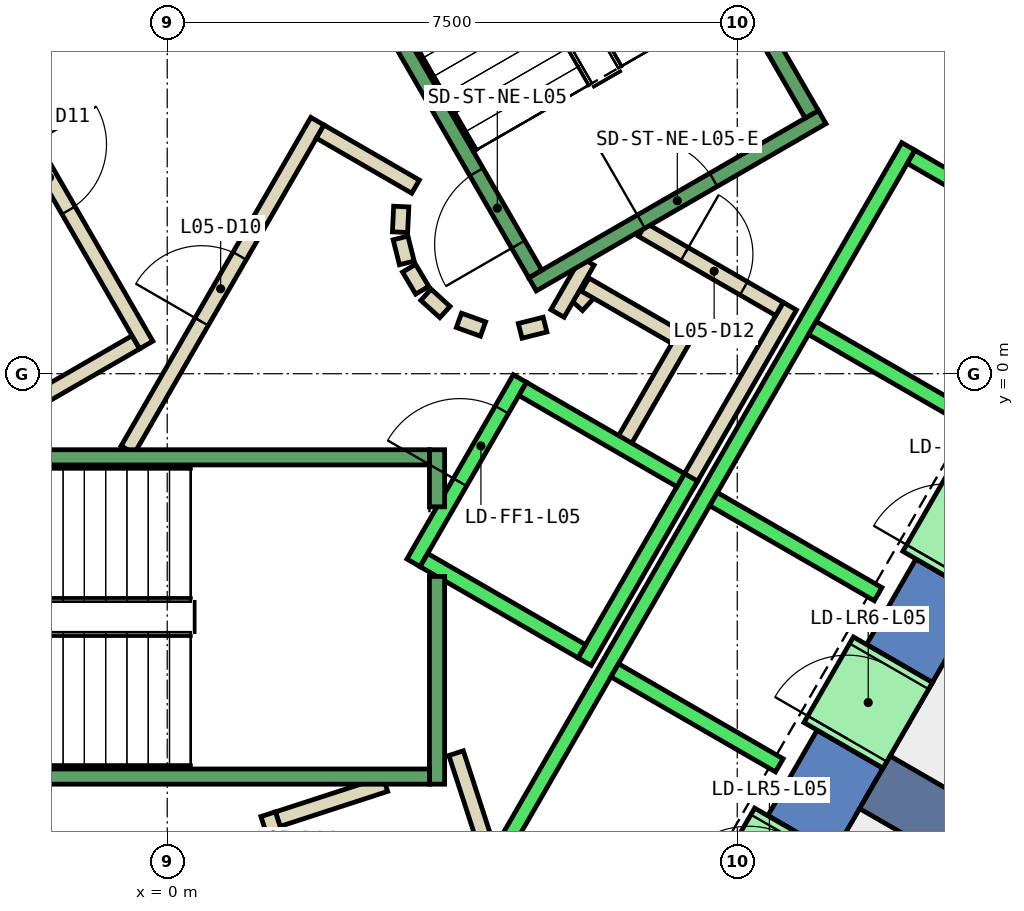
"""IFC4 building model, lengths in metres.
Left out: names, types, materials, properties, quantities, classifications, styles, units other than length and angle.
Written with IfcOpenShell. Run it as: python <this file> out.ifc"""

import sys

from ifc_helpers import new_model, si_unit, direction, frame, frame_2d, origin, place, context, subcontext, project, spatial, polyline, rectangle, outline, extrude, element, fill, save


model = new_model("IFC4")
c1 = context("Model", 3, precision=1e-05, world=origin(), true_north=direction((0.0, 1.0)))
c2 = subcontext(c1, "Body", "Model", "MODEL_VIEW")
j1 = project(units=[si_unit("LENGTHUNIT", "METRE"), si_unit("PLANEANGLEUNIT", "RADIAN")], contexts=[c1])
p1 = place(None, origin())
s1 = spatial("IfcSite", under=j1, at=p1, CompositionType="ELEMENT")
p2 = place(p1, origin())
s2 = spatial("IfcBuilding", under=s1, at=p2, CompositionType="ELEMENT")
p3 = place(p2, frame((0.0, 0.0, 30.0)))
s3 = spatial("IfcBuildingStorey", under=s2, at=p3, CompositionType="ELEMENT", Elevation=30.0)
p4 = place(p3, frame((0.0, 0.0, -0.45)))
e1 = element("IfcWall", 1, at=p4, inside=s3, PredefinedType="SHEAR", context=c2, shape_type="SweptSolid", body=[
    extrude(outline(polyline([(8.517, 11.748), (7.651, 11.248), (12.702, 2.5), (13.856, 2.5), (8.517, 11.748)])), origin(), (0.0, 0.0, 1.0), 4.85),
])
p5 = place(p3, frame((0.0, 0.0, -0.45)))
e2 = element("IfcWall", 2, at=p5, inside=s3, PredefinedType="SHEAR", context=c2, shape_type="SweptSolid", body=[
    extrude(outline(polyline([(9.417, -5.189), (8.551, -4.689), (7.902, -5.814), (8.767, -6.314), (9.417, -5.189)])), origin(), (0.0, 0.0, 1.0), 4.85),
])
p6 = place(p3, frame((0.0, 0.0, -0.45)))
e3 = element("IfcWall", 3, at=p6, inside=s3, PredefinedType="SHEAR", context=c2, shape_type="SweptSolid", body=[
    extrude(outline(polyline([(10.717, -2.937), (9.851, -2.437), (9.201, -3.563), (10.067, -4.063), (10.717, -2.937)])), origin(), (0.0, 0.0, 1.0), 4.85),
])
p7 = place(p3, frame((0.0, 0.0, 3.6)))
e4 = element("IfcWall", 4, at=p7, inside=s3, PredefinedType="SHEAR", context=c2, shape_type="SweptSolid", body=[
    extrude(outline(polyline([(8.767, -6.314), (7.902, -5.814), (7.252, -6.94), (8.117, -7.44), (8.767, -6.314)])), origin(), (0.0, 0.0, 1.0), 0.8),
])
p8 = place(p3, frame((0.0, 0.0, 3.6)))
e5 = element("IfcWall", 5, at=p8, inside=s3, PredefinedType="SHEAR", context=c2, shape_type="SweptSolid", body=[
    extrude(outline(polyline([(10.067, -4.063), (9.201, -3.563), (8.551, -4.689), (9.417, -5.189), (10.067, -4.063)])), origin(), (0.0, 0.0, 1.0), 0.8),
])
p9 = place(p3, frame((0.0, 0.0, 3.6)))
e6 = element("IfcWall", 6, at=p9, inside=s3, PredefinedType="SHEAR", context=c2, shape_type="SweptSolid", body=[
    extrude(outline(polyline([(11.367, -1.811), (10.501, -1.311), (9.851, -2.437), (10.717, -2.937), (11.367, -1.811)])), origin(), (0.0, 0.0, 1.0), 0.8),
])
p10 = place(p3, frame((9.31, -5.375, -0.45), z_axis=(0.0, 0.0, 1.0), x_axis=(0.866017533419, -0.500013631625, 0.0)))
e7 = element("IfcWall", 7, at=p10, inside=s3, PredefinedType="SHEAR", context=c2, shape_type="SweptSolid", body=[
    extrude(rectangle(XDim=9.0, YDim=0.8, at=frame_2d((4.5, 0.0))), origin(), (0.0, 0.0, 1.0), 4.85),
])
p11 = place(p3, frame((5.39, 0.898, 0.0), z_axis=(0.0, 0.0, 1.0), x_axis=(0.673828488714, 0.738887791073, 0.0)))
e8 = element("IfcWall", 8, at=p11, inside=s3, PredefinedType="PARTITIONING", context=c2, shape_type="SweptSolid", body=[
    extrude(rectangle(XDim=0.263, YDim=0.2, at=frame_2d((0.131, 0.0))), origin(), (0.0, 0.0, 1.0), 4.4),
])
p12 = place(p3, frame((5.499, 1.172, 0.0), z_axis=(0.0, 0.0, 1.0), x_axis=(0.866333505267, -0.499465972466, 0.0)))
e9 = element("IfcWall", 9, at=p12, inside=s3, PredefinedType="PARTITIONING", context=c2, shape_type="SweptSolid", body=[
    extrude(rectangle(XDim=1.374, YDim=0.2, at=frame_2d((0.687, 0.0))), origin(), (0.0, 0.0, 1.0), 4.4),
])
p13 = place(p3, frame((6.826, 0.522, 0.0), z_axis=(0.0, 0.0, 1.0), x_axis=(-0.500016722714, -0.866015748706, 0.0)))
e10 = element("IfcWall", 10, at=p13, inside=s3, PredefinedType="PARTITIONING", context=c2, shape_type="SweptSolid", body=[
    extrude(rectangle(XDim=1.7, YDim=0.2, at=frame_2d((0.85, 0.0))), origin(), (0.0, 0.0, 1.0), 4.4),
])
p14 = place(p3, frame((8.192, 0.888, 0.0), z_axis=(0.0, 0.0, 1.0), x_axis=(-0.499940625693, -0.866059680843, 0.0)))
e11 = element("IfcWall", 11, at=p14, inside=s3, PredefinedType="PARTITIONING", context=c2, shape_type="SweptSolid", body=[
    extrude(rectangle(XDim=2.68, YDim=0.2, at=frame_2d((1.34, 0.0))), origin(), (0.0, 0.0, 1.0), 4.4),
])
p15 = place(p3, frame((5.135, 0.793, 0.0), z_axis=(0.0, 0.0, 1.0), x_axis=(0.499526442893, 0.866298639529, 0.0)))
e12 = element("IfcWall", 12, at=p15, inside=s3, PredefinedType="PARTITIONING", context=c2, shape_type="SweptSolid", body=[
    extrude(rectangle(XDim=0.791, YDim=0.2, at=frame_2d((0.396, 0.0))), origin(), (0.0, 0.0, 1.0), 4.4),
])
p16 = place(p3, frame((6.25, 1.894, 0.0), z_axis=(0.0, 0.0, 1.0), x_axis=(0.866043184279, -0.499969202016, 0.0)))
e13 = element("IfcWall", 13, at=p16, inside=s3, PredefinedType="PARTITIONING", context=c2, shape_type="SweptSolid", body=[
    extrude(rectangle(XDim=2.084, YDim=0.2, at=frame_2d((1.042, 0.0))), origin(), (0.0, 0.0, 1.0), 4.4),
])
p17 = place(p16, frame((0.642, 0.0, 0.0)))
e14 = element("IfcOpeningElement", 14, at=p17, cuts=e13, PredefinedType="OPENING", context=c2, shape_type="SweptSolid", body=[
    extrude(rectangle(XDim=0.9, YDim=2.1, at=frame_2d((0.45, 1.05))), frame((0.0, 0.11, 0.0), z_axis=(0.0, -1.0, 0.0), x_axis=(1.0, 0.0, 0.0)), (0.0, 0.0, 1.0), 0.22),
])
p18 = place(p3, frame((2.869, -5.4, 0.0), z_axis=(0.0, 0.0, 1.0), x_axis=(-0.950892787506, -0.309520446287, 0.0)))
e15 = element("IfcWall", 15, at=p18, inside=s3, PredefinedType="PARTITIONING", context=c2, shape_type="SweptSolid", body=[
    extrude(rectangle(XDim=1.487, YDim=0.2, at=frame_2d((0.743, 0.0))), origin(), (0.0, 0.0, 1.0), 4.4),
])
p19 = place(p3, frame((1.328, -5.795, 0.0), z_axis=(0.0, 0.0, 1.0), x_axis=(0.309171157328, -0.951006411901, 0.0)))
e16 = element("IfcWall", 16, at=p19, inside=s3, PredefinedType="PARTITIONING", context=c2, shape_type="SweptSolid", body=[
    extrude(rectangle(XDim=2.401, YDim=0.2, at=frame_2d((1.2, 0.0))), origin(), (0.0, 0.0, 1.0), 4.4),
])
p20 = place(p19, frame((0.75, 0.0, 0.0)))
e17 = element("IfcOpeningElement", 17, at=p20, cuts=e16, PredefinedType="OPENING", context=c2, shape_type="SweptSolid", body=[
    extrude(rectangle(XDim=0.9, YDim=2.1, at=frame_2d((0.45, 1.05))), frame((0.0, 0.11, 0.0), z_axis=(0.0, -1.0, 0.0), x_axis=(1.0, 0.0, 0.0)), (0.0, 0.0, 1.0), 0.22),
])
p21 = place(p3, frame((4.543, -7.275, 0.0), z_axis=(0.0, 0.0, 1.0), x_axis=(-0.309079173229, 0.951036310914, 0.0)))
e18 = element("IfcWall", 18, at=p21, inside=s3, PredefinedType="PARTITIONING", context=c2, shape_type="SweptSolid", body=[
    extrude(rectangle(XDim=2.4, YDim=0.2, at=frame_2d((1.2, 0.0))), origin(), (0.0, 0.0, 1.0), 4.4),
])
p22 = place(p3, frame((3.079, 2.199, 0.0), z_axis=(0.0, 0.0, 1.0), x_axis=(-0.047771483479, -0.998858290933, 0.0)))
e19 = element("IfcWall", 19, at=p22, inside=s3, PredefinedType="PARTITIONING", context=c2, shape_type="SweptSolid", body=[
    extrude(rectangle(XDim=0.337, YDim=0.2, at=frame_2d((0.169, 0.0))), origin(), (0.0, 0.0, 1.0), 4.4),
])
p23 = place(p3, frame((3.07, 1.786, 0.0), z_axis=(0.0, 0.0, 1.0), x_axis=(0.242705583207, -0.970099994784, 0.0)))
e20 = element("IfcWall", 20, at=p23, inside=s3, PredefinedType="PARTITIONING", context=c2, shape_type="SweptSolid", body=[
    extrude(rectangle(XDim=0.338, YDim=0.2, at=frame_2d((0.169, 0.0))), origin(), (0.0, 0.0, 1.0), 4.4),
])
for number, where, z_axis, x_axis in (
    (21, (3.182, 1.388, 0.0), (0.0, 0.0, 1.0), (0.512, -0.859, 0.0)),
    (22, (3.404, 1.039, 0.0), (0.0, 0.0, 1.0), (0.74, -0.672, 0.0)),
):
    element("IfcWall", number, at=place(p3, frame(where, z_axis=z_axis, x_axis=x_axis)), inside=s3, PredefinedType="PARTITIONING", context=c2, shape_type="SweptSolid", body=[
        extrude(rectangle(XDim=0.338, YDim=0.2, at=frame_2d((0.169, 0.0))), origin(), (0.0, 0.0, 1.0), 4.4),
    ])
p24 = place(p3, frame((3.838, 0.702, 0.0), z_axis=(0.0, 0.0, 1.0), x_axis=(0.941035081519, -0.338308993895, 0.0)))
e23 = element("IfcWall", 23, at=p24, inside=s3, PredefinedType="PARTITIONING", context=c2, shape_type="SweptSolid", body=[
    extrude(rectangle(XDim=0.337, YDim=0.2, at=frame_2d((0.168, 0.0))), origin(), (0.0, 0.0, 1.0), 4.4),
])
p25 = place(p3, frame((4.644, 0.564, 0.0), z_axis=(0.0, 0.0, 1.0), x_axis=(0.969929076366, 0.243387729394, 0.0)))
e24 = element("IfcWall", 24, at=p25, inside=s3, PredefinedType="PARTITIONING", context=c2, shape_type="SweptSolid", body=[
    extrude(rectangle(XDim=0.337, YDim=0.2, at=frame_2d((0.168, 0.0))), origin(), (0.0, 0.0, 1.0), 4.4),
])
p26 = place(p3, frame((-0.52, -1.0, 0.0), z_axis=(0.0, 0.0, 1.0), x_axis=(0.50011622646, 0.865958290007, 0.0)))
e25 = element("IfcWall", 25, at=p26, inside=s3, PredefinedType="PARTITIONING", context=c2, shape_type="SweptSolid", body=[
    extrude(rectangle(XDim=4.991, YDim=0.2, at=frame_2d((2.496, 0.0))), origin(), (0.0, 0.0, 1.0), 4.4),
])
p27 = place(p26, frame((1.945, 0.0, 0.0)))
e26 = element("IfcOpeningElement", 26, at=p27, cuts=e25, PredefinedType="OPENING", context=c2, shape_type="SweptSolid", body=[
    extrude(rectangle(XDim=1.0, YDim=2.1, at=frame_2d((0.5, 1.05))), frame((0.0, 0.11, 0.0), z_axis=(0.0, -1.0, 0.0), x_axis=(1.0, 0.0, 0.0)), (0.0, 0.0, 1.0), 0.22),
])
p28 = place(p3, frame((2.012, 3.186, 0.0), z_axis=(0.0, 0.0, 1.0), x_axis=(0.865891012941, -0.500232699559, 0.0)))
e27 = element("IfcWall", 27, at=p28, inside=s3, PredefinedType="PARTITIONING", context=c2, shape_type="SweptSolid", body=[
    extrude(rectangle(XDim=1.449, YDim=0.2, at=frame_2d((0.725, 0.0))), origin(), (0.0, 0.0, 1.0), 4.4),
])
p29 = place(p3, frame((-0.412, 0.414, 0.0), z_axis=(0.0, 0.0, 1.0), x_axis=(-0.866017369001, -0.500013916395, 0.0)))
e28 = element("IfcWall", 28, at=p29, inside=s3, PredefinedType="PARTITIONING", context=c2, shape_type="SweptSolid", body=[
    extrude(rectangle(XDim=1.45, YDim=0.2, at=frame_2d((0.725, 0.0))), origin(), (0.0, 0.0, 1.0), 4.4),
])
p30 = place(p3, frame((-2.771, 4.7, 0.0), z_axis=(0.0, 0.0, 1.0), x_axis=(0.499969479948, -0.866043023828, 0.0)))
e29 = element("IfcWall", 29, at=p30, inside=s3, PredefinedType="PARTITIONING", context=c2, shape_type="SweptSolid", body=[
    extrude(rectangle(XDim=4.99, YDim=0.2, at=frame_2d((2.495, 0.0))), origin(), (0.0, 0.0, 1.0), 4.4),
])
p31 = place(p30, frame((1.945, 0.0, 0.0)))
e30 = element("IfcOpeningElement", 30, at=p31, cuts=e29, PredefinedType="OPENING", context=c2, shape_type="SweptSolid", body=[
    extrude(rectangle(XDim=1.0, YDim=2.1, at=frame_2d((0.5, 1.05))), frame((0.0, 0.11, 0.0), z_axis=(0.0, -1.0, 0.0), x_axis=(1.0, 0.0, 0.0)), (0.0, 0.0, 1.0), 0.22),
])
p32 = place(p3, frame((3.24, -2.488, 0.0), z_axis=(0.0, 0.0, 1.0), x_axis=(0.49994636267, 0.866056369097, 0.0)))
e31 = element("IfcWall", 31, at=p32, inside=s3, PredefinedType="STANDARD", context=c2, shape_type="SweptSolid", body=[
    extrude(rectangle(XDim=2.8, YDim=0.2, at=frame_2d((1.4, 0.0))), origin(), (0.0, 0.0, 1.0), 4.4),
])
p33 = place(p32, frame((1.225, 0.0, 0.0)))
e32 = element("IfcOpeningElement", 32, at=p33, cuts=e31, PredefinedType="OPENING", context=c2, shape_type="SweptSolid", body=[
    extrude(rectangle(XDim=1.1, YDim=2.1, at=frame_2d((0.55, 1.05))), frame((0.0, 0.11, 0.0), z_axis=(0.0, -1.0, 0.0), x_axis=(1.0, 0.0, 0.0)), (0.0, 0.0, 1.0), 0.22),
])
p34 = place(p3, frame((5.492, -3.788, 0.0), z_axis=(0.0, 0.0, 1.0), x_axis=(0.500011755427, 0.866018616679, 0.0)))
e33 = element("IfcWall", 33, at=p34, inside=s3, PredefinedType="STANDARD", context=c2, shape_type="SweptSolid", body=[
    extrude(rectangle(XDim=2.8, YDim=0.2, at=frame_2d((1.4, 0.0))), origin(), (0.0, 0.0, 1.0), 4.4),
])
p35 = place(p3, frame((3.377, -2.452, 0.0), z_axis=(0.0, 0.0, 1.0), x_axis=(0.865955154139, -0.50012165622, 0.0)))
e34 = element("IfcWall", 34, at=p35, inside=s3, PredefinedType="STANDARD", context=c2, shape_type="SweptSolid", body=[
    extrude(rectangle(XDim=2.4, YDim=0.2, at=frame_2d((1.2, 0.0))), origin(), (0.0, 0.0, 1.0), 4.4),
])
p36 = place(p3, frame((4.677, -0.2, 0.0), z_axis=(0.0, 0.0, 1.0), x_axis=(0.865973769406, -0.500089422704, 0.0)))
e35 = element("IfcWall", 35, at=p36, inside=s3, PredefinedType="STANDARD", context=c2, shape_type="SweptSolid", body=[
    extrude(rectangle(XDim=2.399, YDim=0.2, at=frame_2d((1.2, 0.0))), origin(), (0.0, 0.0, 1.0), 4.4),
])
p37 = place(p3, frame((4.451, -6.19, 0.0), z_axis=(0.0, 0.0, 1.0), x_axis=(0.50000090737, 0.866024879913, 0.0)))
e36 = element("IfcWall", 36, at=p37, inside=s3, PredefinedType="STANDARD", context=c2, shape_type="SweptSolid", body=[
    extrude(rectangle(XDim=10.6, YDim=0.2, at=frame_2d((5.3, 0.0))), origin(), (0.0, 0.0, 1.0), 4.4),
])
for number, where, z_axis, x_axis in (
    (37, (5.888, -3.902, 0.0), (0.0, 0.0, 1.0), (0.866, -0.5, 0.0)),
    (38, (7.188, -1.65, 0.0), (0.0, 0.0, 1.0), (0.866, -0.5, 0.0)),
    (39, (8.488, 0.602, 0.0), (0.0, 0.0, 1.0), (0.866, -0.5, 0.0)),
):
    element("IfcWall", number, at=place(p3, frame(where, z_axis=z_axis, x_axis=x_axis)), inside=s3, PredefinedType="STANDARD", context=c2, shape_type="SweptSolid", body=[
        extrude(rectangle(XDim=2.5, YDim=0.2, at=frame_2d((1.25, 0.0))), origin(), (0.0, 0.0, 1.0), 4.4),
    ])
p38 = place(p3, frame((9.788, 2.853, 0.0), z_axis=(0.0, 0.0, 1.0), x_axis=(0.865998541277, -0.500046524342, 0.0)))
e40 = element("IfcWall", 40, at=p38, inside=s3, PredefinedType="STANDARD", context=c2, shape_type="SweptSolid", body=[
    extrude(rectangle(XDim=2.5, YDim=0.2, at=frame_2d((1.25, 0.0))), origin(), (0.0, 0.0, 1.0), 4.4),
])
p39 = place(p3, frame((7.598, -7.14, 0.0), z_axis=(0.0, 0.0, 1.0), x_axis=(0.500362116554, 0.865816234728, 0.0)))
e41 = element("IfcWall", 41, at=p39, inside=s3, PredefinedType="STANDARD", context=c2, shape_type="SweptSolid", body=[
    extrude(rectangle(XDim=1.299, YDim=1.2, at=frame_2d((0.65, 0.0))), origin(), (0.0, 0.0, 1.0), 2.4),
])
p40 = place(p39, frame((0.1, 0.0, 0.0)))
e42 = element("IfcOpeningElement", 42, at=p40, cuts=e41, PredefinedType="OPENING", context=c2, shape_type="SweptSolid", body=[
    extrude(rectangle(XDim=1.1, YDim=2.3, at=frame_2d((0.55, 1.15))), frame((0.0, 0.61, 0.0), z_axis=(0.0, -1.0, 0.0), x_axis=(1.0, 0.0, 0.0)), (0.0, 0.0, 1.0), 1.22),
])
p41 = place(p3, frame((8.898, -4.889, 0.0), z_axis=(0.0, 0.0, 1.0), x_axis=(0.500036693733, 0.866004217611, 0.0)))
e43 = element("IfcWall", 43, at=p41, inside=s3, PredefinedType="STANDARD", context=c2, shape_type="SweptSolid", body=[
    extrude(rectangle(XDim=1.3, YDim=1.2, at=frame_2d((0.65, 0.0))), origin(), (0.0, 0.0, 1.0), 2.4),
])
p42 = place(p41, frame((0.1, 0.0, 0.0)))
e44 = element("IfcOpeningElement", 44, at=p42, cuts=e43, PredefinedType="OPENING", context=c2, shape_type="SweptSolid", body=[
    extrude(rectangle(XDim=1.1, YDim=2.3, at=frame_2d((0.55, 1.15))), frame((0.0, 0.61, 0.0), z_axis=(0.0, -1.0, 0.0), x_axis=(1.0, 0.0, 0.0)), (0.0, 0.0, 1.0), 1.22),
])
p43 = place(p3, frame((10.198, -2.637, 0.0), z_axis=(0.0, 0.0, 1.0), x_axis=(0.49989585183, 0.866085525409, 0.0)))
e45 = element("IfcWall", 45, at=p43, inside=s3, PredefinedType="STANDARD", context=c2, shape_type="SweptSolid", body=[
    extrude(rectangle(XDim=1.3, YDim=1.2, at=frame_2d((0.65, 0.0))), origin(), (0.0, 0.0, 1.0), 2.4),
])
p44 = place(p43, frame((0.1, 0.0, 0.0)))
e46 = element("IfcOpeningElement", 46, at=p44, cuts=e45, PredefinedType="OPENING", context=c2, shape_type="SweptSolid", body=[
    extrude(rectangle(XDim=1.1, YDim=2.3, at=frame_2d((0.55, 1.15))), frame((0.0, 0.61, 0.0), z_axis=(0.0, -1.0, 0.0), x_axis=(1.0, 0.0, 0.0)), (0.0, 0.0, 1.0), 1.22),
])
p45 = place(p3, frame((3.55, -2.667, 0.0), z_axis=(0.0, 0.0, 1.0), x_axis=(0.0, -1.0, 0.0)))
e47 = element("IfcWall", 47, at=p45, inside=s3, PredefinedType="STANDARD", context=c2, shape_type="SweptSolid", body=[
    extrude(rectangle(XDim=2.733, YDim=0.2, at=frame_2d((1.366, 0.0))), origin(), (0.0, 0.0, 1.0), 4.4),
])
p46 = place(p3, frame((3.55, -1.0, 0.0), z_axis=(0.0, 0.0, 1.0), x_axis=(0.0, -1.0, 0.0)))
e48 = element("IfcWall", 48, at=p46, inside=s3, PredefinedType="STANDARD", context=c2, shape_type="SweptSolid", body=[
    extrude(rectangle(XDim=0.751, YDim=0.2, at=frame_2d((0.375, 0.0))), origin(), (0.0, 0.0, 1.0), 4.4),
])
p47 = place(p3, frame((-3.45, -1.1, 0.0), z_axis=(0.0, 0.0, 1.0), x_axis=(1.0, 0.0, 0.0)))
e49 = element("IfcWall", 49, at=p47, inside=s3, PredefinedType="STANDARD", context=c2, shape_type="SweptSolid", body=[
    extrude(rectangle(XDim=6.9, YDim=0.2, at=frame_2d((3.45, 0.0))), origin(), (0.0, 0.0, 1.0), 4.4),
])
p48 = place(p47, frame((0.45, 0.0, 0.0)))
e50 = element("IfcOpeningElement", 50, at=p48, cuts=e49, PredefinedType="OPENING", context=c2, shape_type="SweptSolid", body=[
    extrude(rectangle(XDim=1.1, YDim=2.2, at=frame_2d((0.55, 1.1))), frame((0.0, 0.11, 0.0), z_axis=(0.0, -1.0, 0.0), x_axis=(1.0, 0.0, 0.0)), (0.0, 0.0, 1.0), 0.22),
])
p49 = place(p3, frame((-3.45, -5.3, 0.0), z_axis=(0.0, 0.0, 1.0), x_axis=(1.0, 0.0, 0.0)))
e51 = element("IfcWall", 51, at=p49, inside=s3, PredefinedType="STANDARD", context=c2, shape_type="SweptSolid", body=[
    extrude(rectangle(XDim=6.9, YDim=0.2, at=frame_2d((3.45, 0.0))), origin(), (0.0, 0.0, 1.0), 4.4),
])
p50 = place(p3, frame((4.806, 1.176, 0.0), z_axis=(0.0, 0.0, 1.0), x_axis=(0.866059941101, 0.499940174841, 0.0)))
e52 = element("IfcWall", 52, at=p50, inside=s3, PredefinedType="STANDARD", context=c2, shape_type="SweptSolid", body=[
    extrude(rectangle(XDim=4.4, YDim=0.2, at=frame_2d((2.2, 0.0))), origin(), (0.0, 0.0, 1.0), 4.4),
])
p51 = place(p50, frame((1.65, 0.0, 0.0)))
e53 = element("IfcOpeningElement", 53, at=p51, cuts=e52, PredefinedType="OPENING", context=c2, shape_type="SweptSolid", body=[
    extrude(rectangle(XDim=1.1, YDim=2.2, at=frame_2d((0.55, 1.1))), frame((0.0, 0.11, 0.0), z_axis=(0.0, -1.0, 0.0), x_axis=(1.0, 0.0, 0.0)), (0.0, 0.0, 1.0), 0.22),
])
p52 = place(p3, frame((4.843, 1.312, 0.0), z_axis=(0.0, 0.0, 1.0), x_axis=(-0.499963383562, 0.866046543262, 0.0)))
e54 = element("IfcWall", 54, at=p52, inside=s3, PredefinedType="STANDARD", context=c2, shape_type="SweptSolid", body=[
    extrude(rectangle(XDim=6.9, YDim=0.2, at=frame_2d((3.45, 0.0))), origin(), (0.0, 0.0, 1.0), 4.4),
])
p53 = place(p52, frame((0.45, 0.0, 0.0)))
e55 = element("IfcOpeningElement", 55, at=p53, cuts=e54, PredefinedType="OPENING", context=c2, shape_type="SweptSolid", body=[
    extrude(rectangle(XDim=1.1, YDim=2.2, at=frame_2d((0.55, 1.1))), frame((0.0, 0.11, 0.0), z_axis=(0.0, -1.0, 0.0), x_axis=(1.0, 0.0, 0.0)), (0.0, 0.0, 1.0), 0.22),
])
p54 = place(p3, frame((8.48, 3.412, 0.0), z_axis=(0.0, 0.0, 1.0), x_axis=(-0.499978703459, 0.866037698999, 0.0)))
e56 = element("IfcWall", 56, at=p54, inside=s3, PredefinedType="STANDARD", context=c2, shape_type="SweptSolid", body=[
    extrude(rectangle(XDim=6.9, YDim=0.2, at=frame_2d((3.45, 0.0))), origin(), (0.0, 0.0, 1.0), 4.4),
])
p55 = place(p3, frame((-1.393, 7.288, 0.0), z_axis=(0.0, 0.0, 1.0), x_axis=(-0.499963383562, -0.866046543262, 0.0)))
e57 = element("IfcWall", 57, at=p55, inside=s3, PredefinedType="STANDARD", context=c2, shape_type="SweptSolid", body=[
    extrude(rectangle(XDim=6.9, YDim=0.2, at=frame_2d((3.45, 0.0))), origin(), (0.0, 0.0, 1.0), 4.4),
])
p56 = place(p55, frame((0.45, 0.0, 0.0)))
e58 = element("IfcOpeningElement", 58, at=p56, cuts=e57, PredefinedType="OPENING", context=c2, shape_type="SweptSolid", body=[
    extrude(rectangle(XDim=1.1, YDim=2.2, at=frame_2d((0.55, 1.1))), frame((0.0, 0.11, 0.0), z_axis=(0.0, -1.0, 0.0), x_axis=(1.0, 0.0, 0.0)), (0.0, 0.0, 1.0), 0.22),
])
p57 = place(p27, origin())
e59 = element("IfcDoor", 59, at=p57, inside=s3, OperationType="SINGLE_SWING_LEFT", PredefinedType="DOOR", context=c2, shape_type="SweptSolid", body=[
    extrude(rectangle(XDim=1.0, YDim=2.1, at=frame_2d((0.5, 1.05))), frame((0.0, 0.025, 0.0), z_axis=(0.0, -1.0, 0.0), x_axis=(1.0, 0.0, 0.0)), (0.0, 0.0, 1.0), 0.05),
])
fill(e26, e59)
p58 = place(p31, origin())
e60 = element("IfcDoor", 60, at=p58, inside=s3, OperationType="SINGLE_SWING_RIGHT", PredefinedType="DOOR", context=c2, shape_type="SweptSolid", body=[
    extrude(rectangle(XDim=1.0, YDim=2.1, at=frame_2d((0.5, 1.05))), frame((0.0, 0.025, 0.0), z_axis=(0.0, -1.0, 0.0), x_axis=(1.0, 0.0, 0.0)), (0.0, 0.0, 1.0), 0.05),
])
fill(e30, e60)
p59 = place(p17, origin())
e61 = element("IfcDoor", 61, at=p59, inside=s3, OperationType="SINGLE_SWING_LEFT", PredefinedType="DOOR", context=c2, shape_type="SweptSolid", body=[
    extrude(rectangle(XDim=0.9, YDim=2.1, at=frame_2d((0.45, 1.05))), frame((0.0, 0.025, 0.0), z_axis=(0.0, -1.0, 0.0), x_axis=(1.0, 0.0, 0.0)), (0.0, 0.0, 1.0), 0.05),
])
fill(e14, e61)
p60 = place(p42, origin())
e62 = element("IfcDoor", 62, at=p60, inside=s3, OperationType="SLIDING_TO_LEFT", PredefinedType="DOOR", context=c2, shape_type="SweptSolid", body=[
    extrude(rectangle(XDim=1.1, YDim=2.3, at=frame_2d((0.55, 1.15))), frame((0.0, 0.025, 0.0), z_axis=(0.0, -1.0, 0.0), x_axis=(1.0, 0.0, 0.0)), (0.0, 0.0, 1.0), 0.05),
])
fill(e44, e62)
p61 = place(p33, origin())
e63 = element("IfcDoor", 63, at=p61, inside=s3, OperationType="SLIDING_TO_LEFT", PredefinedType="DOOR", context=c2, shape_type="SweptSolid", body=[
    extrude(rectangle(XDim=1.1, YDim=2.1, at=frame_2d((0.55, 1.05))), frame((0.0, 0.025, 0.0), z_axis=(0.0, -1.0, 0.0), x_axis=(1.0, 0.0, 0.0)), (0.0, 0.0, 1.0), 0.05),
])
fill(e32, e63)
p62 = place(p53, origin())
e64 = element("IfcDoor", 64, at=p62, inside=s3, OperationType="SINGLE_SWING_LEFT", PredefinedType="DOOR", context=c2, shape_type="SweptSolid", body=[
    extrude(rectangle(XDim=1.1, YDim=2.2, at=frame_2d((0.55, 1.1))), frame((0.0, 0.025, 0.0), z_axis=(0.0, -1.0, 0.0), x_axis=(1.0, 0.0, 0.0)), (0.0, 0.0, 1.0), 0.05),
])
fill(e55, e64)
p63 = place(p51, origin())
e65 = element("IfcDoor", 65, at=p63, inside=s3, OperationType="SINGLE_SWING_LEFT", PredefinedType="DOOR", context=c2, shape_type="SweptSolid", body=[
    extrude(rectangle(XDim=1.1, YDim=2.2, at=frame_2d((0.55, 1.1))), frame((0.0, 0.025, 0.0), z_axis=(0.0, -1.0, 0.0), x_axis=(1.0, 0.0, 0.0)), (0.0, 0.0, 1.0), 0.05),
])
fill(e53, e65)
save(model, sys.argv[1])
